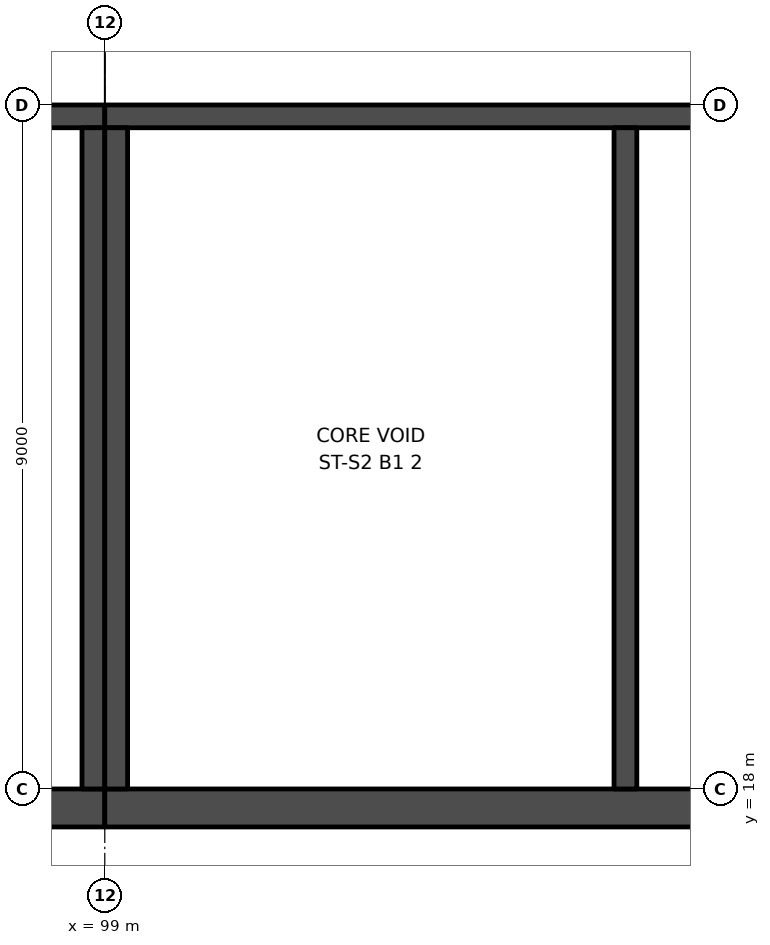
"""IFC4 building model, lengths in metres.
Left out: names, types, materials, properties, quantities, classifications, styles, units other than length and angle.
Written with IfcOpenShell. Run it as: python <this file> out.ifc"""

import sys

from ifc_helpers import new_model, si_unit, direction, frame, frame_2d, origin, place, context, subcontext, project, spatial, rectangle, extrude, element, save


model = new_model("IFC4")
c1 = context("Model", 3, precision=1e-05, world=origin(), true_north=direction((0.0, 1.0)))
c2 = subcontext(c1, "Body", "Model", "MODEL_VIEW")
j1 = project(units=[si_unit("LENGTHUNIT", "METRE"), si_unit("PLANEANGLEUNIT", "RADIAN")], contexts=[c1])
p1 = place(None, origin())
s1 = spatial("IfcSite", under=j1, at=p1, CompositionType="ELEMENT")
p2 = place(p1, origin())
s2 = spatial("IfcBuilding", under=s1, at=p2, CompositionType="ELEMENT")
p3 = place(p2, frame((0.0, 0.0, -6.0)))
s3 = spatial("IfcBuildingStorey", under=s2, at=p3, CompositionType="ELEMENT", Elevation=-6.0)
p4 = place(p3, frame((81.0, 26.85, 0.0), z_axis=(0.0, 0.0, 1.0), x_axis=(1.0, 0.0, 0.0)))
e1 = element("IfcWall", 1, at=p4, inside=s3, PredefinedType="SHEAR", context=c2, shape_type="SweptSolid", body=[
    extrude(rectangle(XDim=18.0, YDim=0.3, at=frame_2d((9.0, 0.0))), origin(), (0.0, 0.0, 1.0), 6.0),
])
p5 = place(p3, frame((81.0, 17.75, 0.0), z_axis=(0.0, 0.0, 1.0), x_axis=(1.0, 0.0, 0.0)))
e2 = element("IfcWall", 2, at=p5, inside=s3, PredefinedType="SHEAR", context=c2, shape_type="SweptSolid", body=[
    extrude(rectangle(XDim=18.0, YDim=0.5, at=frame_2d((9.0, 0.0))), origin(), (0.0, 0.0, 1.0), 6.0),
])
p6 = place(p3, frame((98.85, 26.7, 0.0), z_axis=(0.0, 0.0, 1.0), x_axis=(0.0, -1.0, 0.0)))
e3 = element("IfcWall", 3, at=p6, inside=s3, PredefinedType="SHEAR", context=c2, shape_type="SweptSolid", body=[
    extrude(rectangle(XDim=8.7, YDim=0.3, at=frame_2d((4.35, 0.0))), origin(), (0.0, 0.0, 1.0), 6.0),
])
p7 = place(p3, frame((117.0, 26.85, 0.0), z_axis=(0.0, 0.0, 1.0), x_axis=(-1.0, 0.0, 0.0)))
e4 = element("IfcWall", 4, at=p7, inside=s3, PredefinedType="SHEAR", context=c2, shape_type="SweptSolid", body=[
    extrude(rectangle(XDim=18.0, YDim=0.3, at=frame_2d((9.0, 0.0))), origin(), (0.0, 0.0, 1.0), 6.0),
])
p8 = place(p7, frame((1.5, 0.0, 0.0)))
e5 = element("IfcOpeningElement", 5, at=p8, cuts=e4, PredefinedType="OPENING", context=c2, shape_type="SweptSolid", body=[
    extrude(rectangle(XDim=1.2, YDim=2.1, at=frame_2d((0.6, 1.05))), frame((0.0, 0.16, 0.0), z_axis=(0.0, -1.0, 0.0), x_axis=(1.0, 0.0, 0.0)), (0.0, 0.0, 1.0), 0.32),
])
p9 = place(p3, frame((117.0, 17.75, 0.0), z_axis=(0.0, 0.0, 1.0), x_axis=(-1.0, 0.0, 0.0)))
e6 = element("IfcWall", 6, at=p9, inside=s3, PredefinedType="SHEAR", context=c2, shape_type="SweptSolid", body=[
    extrude(rectangle(XDim=18.0, YDim=0.5, at=frame_2d((9.0, 0.0))), origin(), (0.0, 0.0, 1.0), 6.0),
])
for number, where, z_axis, x_axis in (
    (7, (99.15, 26.7, 0.0), (0.0, 0.0, 1.0), (0.0, -1.0, 0.0)),
    (8, (105.85, 26.7, 0.0), (0.0, 0.0, 1.0), (0.0, -1.0, 0.0)),
):
    element("IfcWall", number, at=place(p3, frame(where, z_axis=z_axis, x_axis=x_axis)), inside=s3, PredefinedType="SHEAR", context=c2, shape_type="SweptSolid", body=[
        extrude(rectangle(XDim=8.7, YDim=0.3, at=frame_2d((4.35, 0.0))), origin(), (0.0, 0.0, 1.0), 6.0),
    ])
save(model, sys.argv[1])
